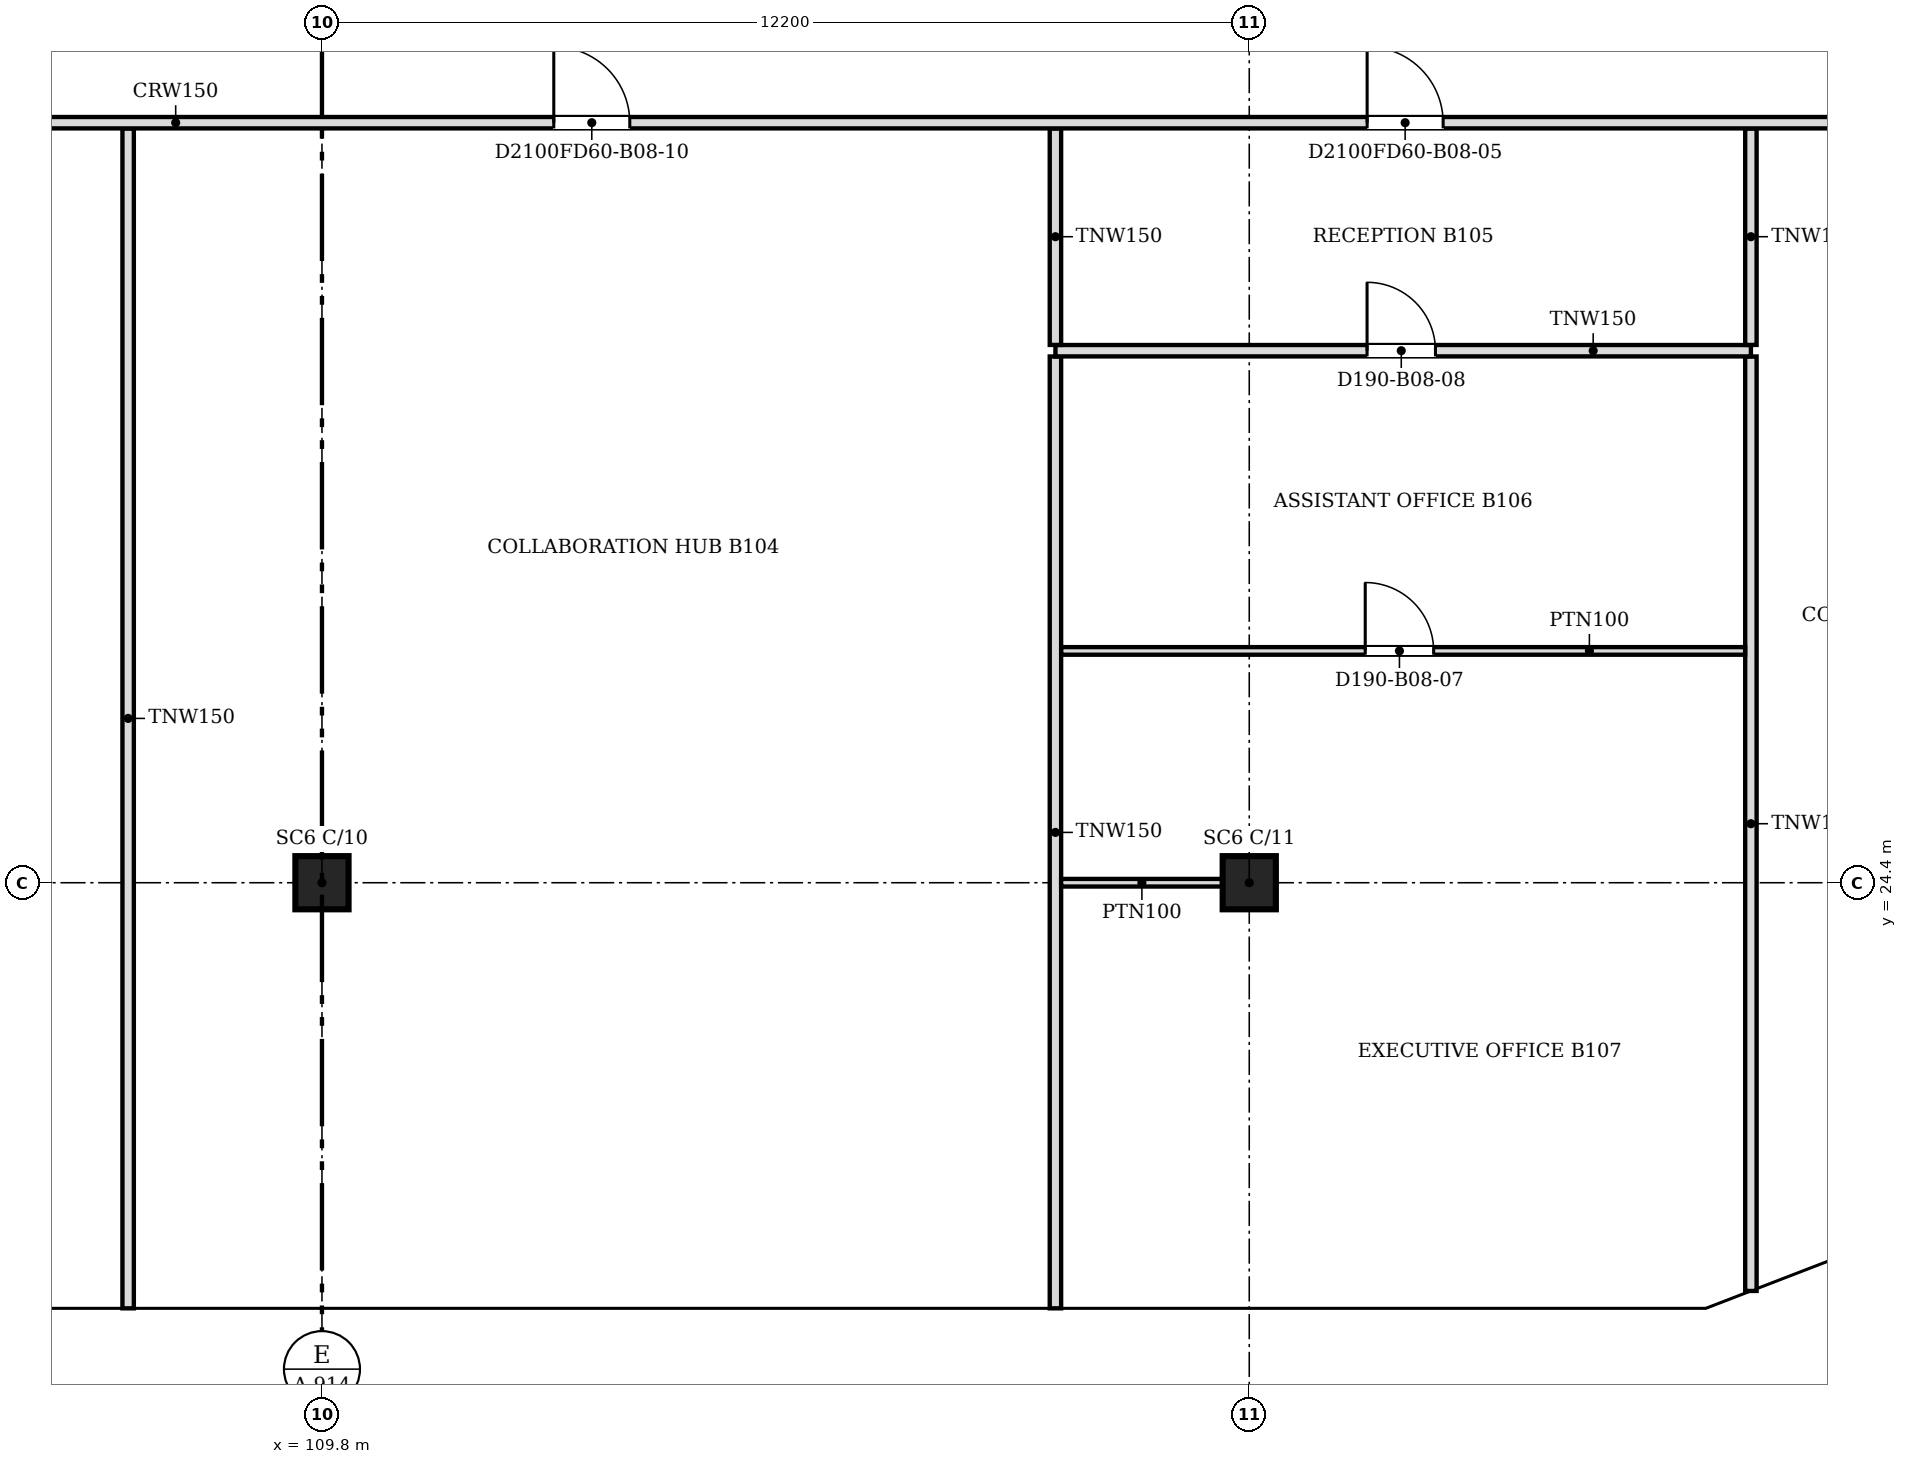
"""IFC4 building model, lengths in metres.
Left out: names, types, materials, properties, quantities, classifications, styles, units other than length and angle.
Written with IfcOpenShell. Run it as: python <this file> out.ifc"""

import sys

from ifc_helpers import new_model, si_unit, direction, frame, frame_2d, origin, origin_2d, place, context, subcontext, project, spatial, polyline, rectangle, outline, extrude, faceted_brep, source, transform, mapped, element, fill, save


model = new_model("IFC4")
c1 = context("Model", 3, precision=1e-05, world=origin(), true_north=direction((0.0, 1.0)))
c2 = subcontext(c1, "Body", "Model", "MODEL_VIEW")
j1 = project(units=[si_unit("LENGTHUNIT", "METRE"), si_unit("PLANEANGLEUNIT", "RADIAN")], contexts=[c1])
p1 = place(None, origin())
s1 = spatial("IfcSite", under=j1, at=p1, CompositionType="ELEMENT")
p2 = place(p1, origin())
s2 = spatial("IfcBuilding", under=s1, at=p2, CompositionType="ELEMENT")
p3 = place(p2, frame((0.0, 0.0, 80.0)))
s3 = spatial("IfcBuildingStorey", under=s2, at=p3, CompositionType="ELEMENT", Elevation=80.0)
for number, where, z_axis, x_axis in (
    (1, (109.8, 24.4, 0.0), (0.0, 0.0, 1.0), (1.0, 0.0, 0.0)),
    (2, (122.0, 24.4, 0.0), (0.0, 0.0, 1.0), (1.0, 0.0, 0.0)),
):
    element("IfcColumn", number, at=place(p3, frame(where, z_axis=z_axis, x_axis=x_axis)), inside=s3, PredefinedType="COLUMN", context=c2, shape_type="SweptSolid", body=[
        extrude(rectangle(XDim=0.7, YDim=0.7, at=origin_2d()), origin(), (0.0, 0.0, 1.0), 3.6),
    ])
m1 = source(origin(), c2, "Body", "SweptSolid", [
    extrude(outline(polyline([(3.05, 0.0), (6.1, 3.8), (3.05, 7.6), (0.0, 3.8), (3.05, 0.0)])), frame((0.0, 0.25, 0.0), z_axis=(0.0, -1.0, 0.0), x_axis=(1.0, 0.0, 0.0)), (0.0, 0.0, 1.0), 0.5),
])
p4 = place(p3, frame((103.7, 18.55, -3.8), z_axis=(0.0, 0.0, 1.0), x_axis=(1.0, 0.0, 0.0)))
e3 = element("IfcWall", 3, at=p4, inside=s3, PredefinedType="SOLIDWALL", context=c2, shape_type="MappedRepresentation", body=[
    mapped(m1, transform((0.0, 0.0, 0.0), scale=1.0)),
])
m2 = source(origin(), c2, "Body", "SweptSolid", [
    extrude(outline(polyline([(3.05, 0.399), (5.78, 3.8), (3.05, 7.201), (0.321, 3.8), (3.05, 0.399)])), frame((0.0, 0.26, 0.0), z_axis=(0.0, -1.0, 0.0), x_axis=(1.0, 0.0, 0.0)), (0.0, 0.0, 1.0), 0.52),
])
p5 = place(p4, origin())
e4 = element("IfcOpeningElement", 4, at=p5, cuts=e3, PredefinedType="OPENING", context=c2, shape_type="MappedRepresentation", body=[
    mapped(m2, transform((0.0, 0.0, 0.0), scale=1.0)),
])
m3 = source(origin(), c2, "Body", "Brep", [
    faceted_brep([(3.05, -0.25, 0.0), (6.1, -0.25, 3.8), (6.1, -0.25, 3.8), (3.05, -0.25, 7.6), (0.0, -0.25, 3.8), (0.0, 0.25, 3.8), (3.05, 0.25, 7.6), (6.1, 0.25, 3.8), (6.1, 0.25, 3.8), (3.05, 0.25, 0.0)], [[[0, 1, 2, 3, 4]], [[5, 6, 7, 8, 9]], [[9, 8, 1, 0]], [[7, 6, 3, 2]], [[6, 5, 4, 3]], [[5, 9, 0, 4]], [[1, 8, 7, 2]]]),
])
p6 = place(p3, frame((109.8, 18.55, -3.8), z_axis=(0.0, 0.0, 1.0), x_axis=(1.0, 0.0, 0.0)))
e5 = element("IfcWall", 5, at=p6, inside=s3, PredefinedType="SOLIDWALL", context=c2, shape_type="MappedRepresentation", body=[
    mapped(m3, transform((0.0, 0.0, 0.0), scale=1.0)),
])
p7 = place(p6, origin())
e6 = element("IfcOpeningElement", 6, at=p7, cuts=e5, PredefinedType="OPENING", context=c2, shape_type="MappedRepresentation", body=[
    mapped(m2, transform((0.0, 0.0, 0.0), scale=1.0)),
])
p8 = place(p3, frame((115.9, 18.55, -3.8), z_axis=(0.0, 0.0, 1.0), x_axis=(1.0, 0.0, 0.0)))
e7 = element("IfcWall", 7, at=p8, inside=s3, PredefinedType="SOLIDWALL", context=c2, shape_type="MappedRepresentation", body=[
    mapped(m1, transform((0.0, 0.0, 0.0), scale=1.0)),
])
p9 = place(p8, origin())
e8 = element("IfcOpeningElement", 8, at=p9, cuts=e7, PredefinedType="OPENING", context=c2, shape_type="MappedRepresentation", body=[
    mapped(m2, transform((0.0, 0.0, 0.0), scale=1.0)),
])
m4 = source(origin(), c2, "Body", "Brep", [
    faceted_brep([(3.05, -0.25, 0.0), (6.053, -0.25, 3.8), (3.05, -0.25, 7.6), (0.0, -0.25, 3.8), (0.0, 0.25, 3.8), (3.05, 0.25, 7.6), (6.007, 0.25, 3.859), (6.007, 0.25, 3.741), (3.05, 0.25, 0.0), (6.053, 0.0, 3.8)], [[[0, 1, 2, 3]], [[4, 5, 6, 7, 8]], [[8, 7, 9, 1, 0]], [[6, 5, 2, 1, 9]], [[5, 4, 3, 2]], [[4, 8, 0, 3]], [[9, 7, 6]]]),
])
p10 = place(p3, frame((122.0, 18.55, -3.8), z_axis=(0.0, 0.0, 1.0), x_axis=(1.0, 0.0, 0.0)))
e9 = element("IfcWall", 9, at=p10, inside=s3, PredefinedType="SOLIDWALL", context=c2, shape_type="MappedRepresentation", body=[
    mapped(m4, transform((0.0, 0.0, 0.0), scale=1.0)),
])
m5 = source(origin(), c2, "Body", "SweptSolid", [
    extrude(outline(polyline([(3.049, 0.401), (5.735, 3.8), (3.049, 7.199), (0.321, 3.8), (3.049, 0.401)])), frame((0.0, 0.26, 0.0), z_axis=(0.0, -1.0, 0.0), x_axis=(1.0, 0.0, 0.0)), (0.0, 0.0, 1.0), 0.52),
])
p11 = place(p10, origin())
e10 = element("IfcOpeningElement", 10, at=p11, cuts=e9, PredefinedType="OPENING", context=c2, shape_type="MappedRepresentation", body=[
    mapped(m5, transform((0.0, 0.0, 0.0), scale=1.0)),
])
m6 = source(origin(), c2, "Body", "Brep", [
    faceted_brep([(2.95, -0.25, 0.0), (3.003, -0.25, 0.068), (3.003, -0.25, 7.532), (2.95, -0.25, 7.6), (0.0, -0.25, 3.8), (0.047, 0.25, 3.86), (2.898, 0.25, 7.532), (2.898, 0.25, 0.068), (0.047, 0.25, 3.74), (2.95, 0.0, 0.0), (2.95, 0.0, 7.6), (0.0, 0.0, 3.8)], [[[0, 1, 2, 3, 4]], [[5, 6, 7, 8]], [[1, 0, 9]], [[10, 3, 2]], [[6, 5, 11, 4, 3, 10]], [[8, 7, 9, 0, 4, 11]], [[8, 11, 5]], [[1, 9, 7, 6, 10, 2]]]),
])
p12 = place(p3, frame((128.053, 18.55, -3.8), z_axis=(0.0, 0.0, 1.0), x_axis=(0.933007896601, 0.359855894603, 0.0)))
e11 = element("IfcWall", 11, at=p12, inside=s3, PredefinedType="SOLIDWALL", context=c2, shape_type="MappedRepresentation", body=[
    mapped(m6, transform((0.0, 0.0, 0.0), scale=1.0)),
])
m7 = source(origin(), c2, "Body", "SweptSolid", [
    extrude(outline(polyline([(2.75, 6.935), (0.316, 3.8), (2.75, 0.665), (2.75, 6.935)])), frame((0.0, 0.26, 0.0), z_axis=(0.0, -1.0, 0.0), x_axis=(1.0, 0.0, 0.0)), (0.0, 0.0, 1.0), 0.52),
])
p13 = place(p12, origin())
e12 = element("IfcOpeningElement", 12, at=p13, cuts=e11, PredefinedType="OPENING", context=c2, shape_type="MappedRepresentation", body=[
    mapped(m7, transform((0.0, 0.0, 0.0), scale=1.0)),
])
p14 = place(p2, frame((0.0, 0.0, 83.8)))
s4 = spatial("IfcBuildingStorey", under=s2, at=p14, CompositionType="ELEMENT", Elevation=83.8)
p15 = place(p14, frame((100.65, 18.55, -3.8), z_axis=(0.0, 0.0, 1.0), x_axis=(1.0, 0.0, 0.0)))
e13 = element("IfcWall", 13, at=p15, inside=s4, PredefinedType="SOLIDWALL", context=c2, shape_type="MappedRepresentation", body=[
    mapped(m1, transform((0.0, 0.0, 0.0), scale=1.0)),
])
p16 = place(p15, origin())
e14 = element("IfcOpeningElement", 14, at=p16, cuts=e13, PredefinedType="OPENING", context=c2, shape_type="MappedRepresentation", body=[
    mapped(m2, transform((0.0, 0.0, 0.0), scale=1.0)),
])
p17 = place(p14, frame((106.75, 18.55, -3.8), z_axis=(0.0, 0.0, 1.0), x_axis=(1.0, 0.0, 0.0)))
e15 = element("IfcWall", 15, at=p17, inside=s4, PredefinedType="SOLIDWALL", context=c2, shape_type="MappedRepresentation", body=[
    mapped(m1, transform((0.0, 0.0, 0.0), scale=1.0)),
])
p18 = place(p17, origin())
e16 = element("IfcOpeningElement", 16, at=p18, cuts=e15, PredefinedType="OPENING", context=c2, shape_type="MappedRepresentation", body=[
    mapped(m2, transform((0.0, 0.0, 0.0), scale=1.0)),
])
p19 = place(p14, frame((112.85, 18.55, -3.8), z_axis=(0.0, 0.0, 1.0), x_axis=(1.0, 0.0, 0.0)))
e17 = element("IfcWall", 17, at=p19, inside=s4, PredefinedType="SOLIDWALL", context=c2, shape_type="MappedRepresentation", body=[
    mapped(m3, transform((0.0, 0.0, 0.0), scale=1.0)),
])
p20 = place(p19, origin())
e18 = element("IfcOpeningElement", 18, at=p20, cuts=e17, PredefinedType="OPENING", context=c2, shape_type="MappedRepresentation", body=[
    mapped(m2, transform((0.0, 0.0, 0.0), scale=1.0)),
])
p21 = place(p14, frame((118.95, 18.55, -3.8), z_axis=(0.0, 0.0, 1.0), x_axis=(1.0, 0.0, 0.0)))
e19 = element("IfcWall", 19, at=p21, inside=s4, PredefinedType="SOLIDWALL", context=c2, shape_type="MappedRepresentation", body=[
    mapped(m1, transform((0.0, 0.0, 0.0), scale=1.0)),
])
p22 = place(p21, origin())
e20 = element("IfcOpeningElement", 20, at=p22, cuts=e19, PredefinedType="OPENING", context=c2, shape_type="MappedRepresentation", body=[
    mapped(m2, transform((0.0, 0.0, 0.0), scale=1.0)),
])
m8 = source(origin(), c2, "Body", "Brep", [
    faceted_brep([(3.003, -0.25, 0.0), (3.05, -0.25, 0.06), (3.05, -0.25, 7.54), (3.003, -0.25, 7.6), (0.0, -0.25, 3.8), (0.0, 0.25, 3.8), (2.957, 0.25, 7.541), (2.957, 0.25, 0.059), (3.003, 0.0, 0.0), (3.003, 0.0, 7.6)], [[[0, 1, 2, 3, 4]], [[5, 6, 7]], [[1, 0, 8]], [[9, 3, 2]], [[6, 5, 4, 3, 9]], [[5, 7, 8, 0, 4]], [[1, 8, 7, 6, 9, 2]]]),
])
p23 = place(p14, frame((125.05, 18.55, -3.8), z_axis=(0.0, 0.0, 1.0), x_axis=(1.0, 0.0, 0.0)))
e21 = element("IfcWall", 21, at=p23, inside=s4, PredefinedType="SOLIDWALL", context=c2, shape_type="MappedRepresentation", body=[
    mapped(m8, transform((0.0, 0.0, 0.0), scale=1.0)),
])
m9 = source(origin(), c2, "Body", "SweptSolid", [
    extrude(outline(polyline([(2.803, 6.944), (0.319, 3.8), (2.803, 0.656), (2.803, 6.944)])), frame((0.0, 0.26, 0.0), z_axis=(0.0, -1.0, 0.0), x_axis=(1.0, 0.0, 0.0)), (0.0, 0.0, 1.0), 0.52),
])
p24 = place(p23, origin())
e22 = element("IfcOpeningElement", 22, at=p24, cuts=e21, PredefinedType="OPENING", context=c2, shape_type="MappedRepresentation", body=[
    mapped(m9, transform((0.0, 0.0, 0.0), scale=1.0)),
])
m10 = source(origin(), c2, "Body", "Brep", [
    faceted_brep([(0.047, -0.25, 0.0), (2.997, -0.25, 3.8), (0.047, -0.25, 7.6), (0.0, -0.25, 7.541), (0.0, -0.25, 0.059), (0.093, 0.25, 7.54), (2.944, 0.25, 3.868), (2.944, 0.25, 3.732), (0.093, 0.25, 0.06), (2.997, 0.0, 3.8), (0.047, 0.0, 0.0), (0.047, 0.0, 7.6)], [[[0, 1, 2, 3, 4]], [[5, 6, 7, 8]], [[8, 7, 9, 1, 0, 10]], [[6, 5, 11, 2, 1, 9]], [[3, 2, 11]], [[10, 0, 4]], [[8, 10, 4, 3, 11, 5]], [[9, 7, 6]]]),
])
p25 = place(p14, frame((128.01, 18.533, -3.8), z_axis=(0.0, 0.0, 1.0), x_axis=(0.932990326376, 0.359901446078, 0.0)))
e23 = element("IfcWall", 23, at=p25, inside=s4, PredefinedType="SOLIDWALL", context=c2, shape_type="MappedRepresentation", body=[
    mapped(m10, transform((0.0, 0.0, 0.0), scale=1.0)),
])
m11 = source(origin(), c2, "Body", "SweptSolid", [
    extrude(outline(polyline([(0.247, 0.665), (2.681, 3.8), (0.247, 6.935), (0.247, 0.665)])), frame((0.0, 0.26, 0.0), z_axis=(0.0, -1.0, 0.0), x_axis=(1.0, 0.0, 0.0)), (0.0, 0.0, 1.0), 0.52),
])
p26 = place(p25, origin())
e24 = element("IfcOpeningElement", 24, at=p26, cuts=e23, PredefinedType="OPENING", context=c2, shape_type="MappedRepresentation", body=[
    mapped(m11, transform((0.0, 0.0, 0.0), scale=1.0)),
])
p27 = place(p3, frame((107.25, 18.8, 0.0), z_axis=(0.0, 0.0, 1.0), x_axis=(0.0, 1.0, 0.0)))
e25 = element("IfcWall", 25, at=p27, inside=s3, PredefinedType="PARTITIONING", context=c2, shape_type="SweptSolid", body=[
    extrude(rectangle(XDim=15.524, YDim=0.15, at=frame_2d((7.762, 0.0))), origin(), (0.0, 0.0, 1.0), 3.067),
])
p28 = place(p3, frame((119.45, 18.8, 0.0), z_axis=(0.0, 0.0, 1.0), x_axis=(0.0, 1.0, 0.0)))
e26 = element("IfcWall", 26, at=p28, inside=s3, PredefinedType="PARTITIONING", context=c2, shape_type="SweptSolid", body=[
    extrude(rectangle(XDim=12.524, YDim=0.15, at=frame_2d((6.262, 0.0))), origin(), (0.0, 0.0, 1.0), 3.067),
])
p29 = place(p3, frame((128.6, 19.029, 0.0), z_axis=(0.0, 0.0, 1.0), x_axis=(0.0, 1.0, 0.0)))
e27 = element("IfcWall", 27, at=p29, inside=s3, PredefinedType="PARTITIONING", context=c2, shape_type="SweptSolid", body=[
    extrude(rectangle(XDim=12.295, YDim=0.15, at=frame_2d((6.147, 0.0))), origin(), (0.0, 0.0, 1.0), 3.067),
])
p30 = place(p3, frame((121.65, 24.4, 0.0), z_axis=(0.0, 0.0, 1.0), x_axis=(-1.0, 0.0, 0.0)))
e28 = element("IfcWall", 28, at=p30, inside=s3, PredefinedType="PARTITIONING", context=c2, shape_type="SweptSolid", body=[
    extrude(rectangle(XDim=2.125, YDim=0.1, at=frame_2d((1.062, 0.0))), origin(), (0.0, 0.0, 1.0), 3.067),
])
p31 = place(p3, frame((128.524, 27.45, 0.0), z_axis=(0.0, 0.0, 1.0), x_axis=(-1.0, 0.0, 0.0)))
e29 = element("IfcWall", 29, at=p31, inside=s3, PredefinedType="PARTITIONING", context=c2, shape_type="SweptSolid", body=[
    extrude(rectangle(XDim=8.998, YDim=0.1, at=frame_2d((4.499, 0.0))), origin(), (0.0, 0.0, 1.0), 3.067),
])
m12 = source(origin(), c2, "Body", "SweptSolid", [
    extrude(rectangle(XDim=0.9, YDim=2.1, at=frame_2d((0.45, 1.05))), frame((0.0, 0.06, 0.0), z_axis=(0.0, -1.0, 0.0), x_axis=(1.0, 0.0, 0.0)), (0.0, 0.0, 1.0), 0.12),
])
p32 = place(p31, frame((4.098, 0.0, 0.0)))
e30 = element("IfcOpeningElement", 30, at=p32, cuts=e29, PredefinedType="OPENING", context=c2, shape_type="MappedRepresentation", body=[
    mapped(m12, transform((0.0, 0.0, 0.0), scale=1.0)),
])
p33 = place(p3, frame((128.6, 31.4, 0.0), z_axis=(0.0, 0.0, 1.0), x_axis=(-1.0, 0.0, 0.0)))
e31 = element("IfcWall", 31, at=p33, inside=s3, PredefinedType="PARTITIONING", context=c2, shape_type="SweptSolid", body=[
    extrude(rectangle(XDim=9.15, YDim=0.15, at=frame_2d((4.575, 0.0))), origin(), (0.0, 0.0, 1.0), 3.067),
])
m13 = source(origin(), c2, "Body", "SweptSolid", [
    extrude(rectangle(XDim=0.9, YDim=2.1, at=frame_2d((0.45, 1.05))), frame((0.0, 0.085, 0.0), z_axis=(0.0, -1.0, 0.0), x_axis=(1.0, 0.0, 0.0)), (0.0, 0.0, 1.0), 0.17),
])
p34 = place(p33, frame((4.15, 0.0, 0.0)))
e32 = element("IfcOpeningElement", 32, at=p34, cuts=e31, PredefinedType="OPENING", context=c2, shape_type="MappedRepresentation", body=[
    mapped(m13, transform((0.0, 0.0, 0.0), scale=1.0)),
])
for number, where, z_axis, x_axis in (
    (33, (119.45, 31.476, 0.0), (0.0, 0.0, 1.0), (0.0, 1.0, 0.0)),
    (34, (128.6, 31.476, 0.0), (0.0, 0.0, 1.0), (0.0, 1.0, 0.0)),
):
    element("IfcWall", number, at=place(p3, frame(where, z_axis=z_axis, x_axis=x_axis)), inside=s3, PredefinedType="PARTITIONING", context=c2, shape_type="SweptSolid", body=[
        extrude(rectangle(XDim=2.848, YDim=0.15, at=frame_2d((1.424, 0.0))), origin(), (0.0, 0.0, 1.0), 3.067),
    ])
p35 = place(p3, frame((133.7, 34.4, 0.0), z_axis=(0.0, 0.0, 1.0), x_axis=(-1.0, 0.0, 0.0)))
e35 = element("IfcWall", 35, at=p35, inside=s3, PredefinedType="PARTITIONING", context=c2, shape_type="SweptSolid", body=[
    extrude(rectangle(XDim=47.8, YDim=0.15, at=frame_2d((23.9, 0.0))), origin(), (0.0, 0.0, 1.0), 3.067),
])
m14 = source(origin(), c2, "Body", "SweptSolid", [
    extrude(rectangle(XDim=1.0, YDim=2.1, at=frame_2d((0.5, 1.05))), frame((0.0, 0.085, 0.0), z_axis=(0.0, -1.0, 0.0), x_axis=(1.0, 0.0, 0.0)), (0.0, 0.0, 1.0), 0.17),
])
p36 = place(p35, frame((2.099, 0.0, 0.0)))
e36 = element("IfcOpeningElement", 36, at=p36, cuts=e35, PredefinedType="OPENING", context=c2, shape_type="MappedRepresentation", body=[
    mapped(m14, transform((0.0, 0.0, 0.0), scale=1.0)),
])
p37 = place(p35, frame((9.149, 0.0, 0.0)))
e37 = element("IfcOpeningElement", 37, at=p37, cuts=e35, PredefinedType="OPENING", context=c2, shape_type="MappedRepresentation", body=[
    mapped(m14, transform((0.0, 0.0, 0.0), scale=1.0)),
])
p38 = place(p35, frame((30.799, 0.0, 0.0)))
e38 = element("IfcOpeningElement", 38, at=p38, cuts=e35, PredefinedType="OPENING", context=c2, shape_type="MappedRepresentation", body=[
    mapped(m14, transform((0.0, 0.0, 0.0), scale=1.0)),
])
p39 = place(p35, frame((41.5, 0.0, 0.0)))
e39 = element("IfcOpeningElement", 39, at=p39, cuts=e35, PredefinedType="OPENING", context=c2, shape_type="MappedRepresentation", body=[
    mapped(m14, transform((0.0, 0.0, 0.0), scale=1.0)),
])
p40 = place(p35, frame((19.85, 0.0, 0.0)))
e40 = element("IfcOpeningElement", 40, at=p40, cuts=e35, PredefinedType="OPENING", context=c2, shape_type="MappedRepresentation", body=[
    mapped(m14, transform((0.0, 0.0, 0.0), scale=1.0)),
])
m15 = source(origin(), c2, "Body", "SweptSolid", [
    extrude(rectangle(XDim=0.9, YDim=2.1, at=frame_2d((0.45, 1.05))), frame((0.0, 0.025, 0.0), z_axis=(0.0, -1.0, 0.0), x_axis=(1.0, 0.0, 0.0)), (0.0, 0.0, 1.0), 0.05),
])
p41 = place(p32, origin())
e41 = element("IfcDoor", 41, at=p41, inside=s3, OperationType="SINGLE_SWING_RIGHT", PredefinedType="DOOR", context=c2, shape_type="MappedRepresentation", body=[
    mapped(m15, transform((0.0, 0.0, 0.0), scale=1.0)),
])
fill(e30, e41)
m16 = source(origin(), c2, "Body", "SweptSolid", [
    extrude(rectangle(XDim=1.0, YDim=2.1, at=frame_2d((0.5, 1.05))), frame((0.0, 0.025, 0.0), z_axis=(0.0, -1.0, 0.0), x_axis=(1.0, 0.0, 0.0)), (0.0, 0.0, 1.0), 0.05),
])
p42 = place(p37, origin())
e42 = element("IfcDoor", 42, at=p42, inside=s3, OperationType="SINGLE_SWING_RIGHT", PredefinedType="DOOR", context=c2, shape_type="MappedRepresentation", body=[
    mapped(m16, transform((0.0, 0.0, 0.0), scale=1.0)),
])
fill(e37, e42)
p43 = place(p34, origin())
e43 = element("IfcDoor", 43, at=p43, inside=s3, OperationType="SINGLE_SWING_RIGHT", PredefinedType="DOOR", context=c2, shape_type="MappedRepresentation", body=[
    mapped(m15, transform((0.0, 0.0, 0.0), scale=1.0)),
])
fill(e32, e43)
p44 = place(p40, origin())
e44 = element("IfcDoor", 44, at=p44, inside=s3, OperationType="SINGLE_SWING_RIGHT", PredefinedType="DOOR", context=c2, shape_type="MappedRepresentation", body=[
    mapped(m16, transform((0.0, 0.0, 0.0), scale=1.0)),
])
fill(e40, e44)
save(model, sys.argv[1])
